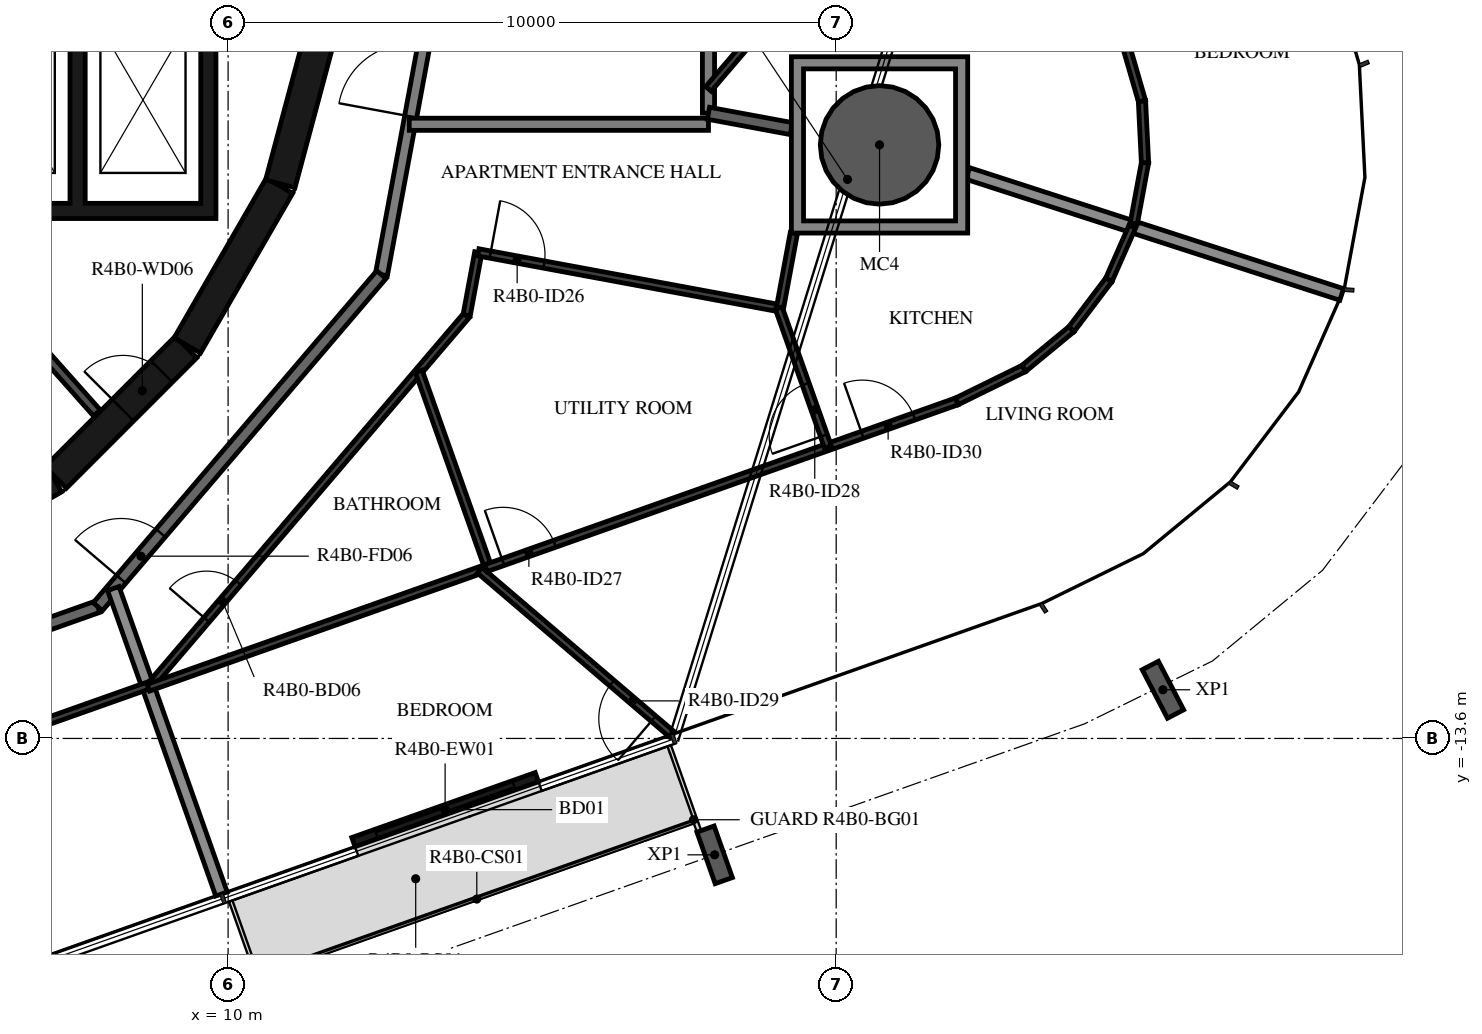
"""IFC4 building model, lengths in metres.
Left out: names, types, materials, properties, quantities, classifications, styles, units other than length and angle.
Written with IfcOpenShell. Run it as: python <this file> out.ifc"""

import sys

from ifc_helpers import new_model, si_unit, direction, frame, frame_2d, origin, origin_2d, place, context, subcontext, project, spatial, polyline, rectangle, hollow_circle, i_section, outline, extrude, element, fill, save


model = new_model("IFC4")
c1 = context("Model", 3, precision=1e-05, world=origin(), true_north=direction((0.0, 1.0)))
c2 = subcontext(c1, "Body", "Model", "MODEL_VIEW")
j1 = project(units=[si_unit("LENGTHUNIT", "METRE"), si_unit("PLANEANGLEUNIT", "RADIAN")], contexts=[c1])
p1 = place(None, origin())
s1 = spatial("IfcSite", under=j1, at=p1, CompositionType="ELEMENT")
p2 = place(p1, origin())
s2 = spatial("IfcBuilding", under=s1, at=p2, CompositionType="ELEMENT")
p3 = place(p2, frame((0.0, 0.0, 165.7)))
s3 = spatial("IfcBuildingStorey", under=s2, at=p3, CompositionType="ELEMENT", Elevation=165.7)
p4 = place(p3, frame((20.713, -3.839, -0.38), z_axis=(0.0, 0.0, 1.0), x_axis=(1.0, 0.0, 0.0)))
e1 = element("IfcColumn", 1, at=p4, inside=s3, PredefinedType="COLUMN", context=c2, shape_type="SweptSolid", body=[
    extrude(hollow_circle(Radius=0.975, WallThickness=0.045, at=origin_2d()), origin(), (0.0, 0.0, 1.0), 3.5),
])
for number, where, z_axis, x_axis in (
    (2, (18.001, -15.514, -0.38), (0.0, 0.0, 1.0), (-0.943, -0.334, 0.0)),
    (3, (25.374, -12.799, -0.38), (0.0, 0.0, 1.0), (-0.887, -0.461, 0.0)),
):
    element("IfcColumn", number, at=place(p3, frame(where, z_axis=z_axis, x_axis=x_axis)), inside=s3, PredefinedType="COLUMN", context=c2, shape_type="SweptSolid", body=[
        extrude(i_section(OverallWidth=0.3, OverallDepth=0.9, WebThickness=0.019, FlangeThickness=0.035, FilletRadius=0.03, at=origin_2d()), origin(), (0.0, 0.0, 1.0), 3.5),
    ])
p5 = place(p3, frame((12.061, -15.305, 0.0), z_axis=(0.0, 0.0, 1.0), x_axis=(0.942620722428, 0.333865502335, 0.0)))
e4 = element("IfcWall", 4, at=p5, inside=s3, PredefinedType="STANDARD", context=c2, shape_type="SweptSolid", body=[
    extrude(rectangle(XDim=3.2, YDim=0.16, at=frame_2d((1.6, 0.0))), origin(), (0.0, 0.0, 1.0), 3.12),
])
p6 = place(p5, frame((0.4, 0.0, 0.0)))
e5 = element("IfcOpeningElement", 5, at=p6, cuts=e4, PredefinedType="OPENING", context=c2, shape_type="SweptSolid", body=[
    extrude(rectangle(XDim=2.4, YDim=2.4, at=frame_2d((1.2, 1.2))), frame((0.0, 0.09, 0.0), z_axis=(0.0, -1.0, 0.0), x_axis=(1.0, 0.0, 0.0)), (0.0, 0.0, 1.0), 0.18),
])
p7 = place(p3, frame((4.51, -10.845, 0.0), z_axis=(0.0, 0.0, 1.0), x_axis=(0.865975092491, 0.500087131594, 0.0)))
e6 = element("IfcWall", 6, at=p7, inside=s3, PredefinedType="SHEAR", context=c2, shape_type="SweptSolid", body=[
    extrude(rectangle(XDim=3.033, YDim=0.5, at=frame_2d((1.516, 0.0))), origin(), (0.0, 0.0, 1.0), 3.12),
])
p8 = place(p7, frame((1.066, 0.0, 0.0)))
e7 = element("IfcOpeningElement", 7, at=p8, cuts=e6, PredefinedType="OPENING", context=c2, shape_type="SweptSolid", body=[
    extrude(rectangle(XDim=0.9, YDim=2.1, at=frame_2d((0.45, 1.05))), frame((0.0, 0.26, 0.0), z_axis=(0.0, -1.0, 0.0), x_axis=(1.0, 0.0, 0.0)), (0.0, 0.0, 1.0), 0.52),
])
p9 = place(p3, frame((7.164, -9.308, 0.0), z_axis=(0.0, 0.0, 1.0), x_axis=(0.707106781187, 0.707106781187, 0.0)))
e8 = element("IfcWall", 8, at=p9, inside=s3, PredefinedType="SHEAR", context=c2, shape_type="SweptSolid", body=[
    extrude(rectangle(XDim=3.032, YDim=0.5, at=frame_2d((1.516, 0.0))), origin(), (0.0, 0.0, 1.0), 3.12),
])
p10 = place(p9, frame((1.566, 0.0, 0.0)))
e9 = element("IfcOpeningElement", 9, at=p10, cuts=e8, PredefinedType="OPENING", context=c2, shape_type="SweptSolid", body=[
    extrude(rectangle(XDim=0.9, YDim=2.1, at=frame_2d((0.45, 1.05))), frame((0.0, 0.26, 0.0), z_axis=(0.0, -1.0, 0.0), x_axis=(1.0, 0.0, 0.0)), (0.0, 0.0, 1.0), 0.52),
])
for number, where, z_axis, x_axis in (
    (10, (9.329, -7.137, 0.0), (0.0, 0.0, 1.0), (0.5, 0.866, 0.0)),
    (11, (10.858, -4.479, 0.0), (0.0, 0.0, 1.0), (0.259, 0.966, 0.0)),
):
    element("IfcWall", number, at=place(p3, frame(where, z_axis=z_axis, x_axis=x_axis)), inside=s3, PredefinedType="SHEAR", context=c2, shape_type="SweptSolid", body=[
        extrude(rectangle(XDim=3.033, YDim=0.5, at=frame_2d((1.516, 0.0))), origin(), (0.0, 0.0, 1.0), 3.12),
    ])
p11 = place(p3, origin())
e12 = element("IfcWall", 12, at=p11, inside=s3, PredefinedType="SHEAR", context=c2, shape_type="SweptSolid", body=[
    extrude(outline(polyline([(9.8, -5.05), (9.8, -4.8), (9.8, -1.9), (9.55, -1.9), (9.55, -4.8), (7.65, -4.8), (7.65, -1.9), (7.4, -1.9), (7.4, -4.8), (5.5, -4.8), (5.5, -1.9), (5.25, -1.9), (5.25, -4.8), (3.35, -4.8), (3.35, -1.9), (3.1, -1.9), (3.1, -4.8), (1.2, -4.8), (1.2, -1.9), (0.95, -1.9), (0.95, -4.8), (-5.25, -4.8), (-5.25, -1.9), (-5.5, -1.9), (-5.5, -4.8), (-7.4, -4.8), (-7.4, -1.9), (-7.65, -1.9), (-7.65, -4.8), (-9.55, -4.8), (-9.55, -1.9), (-9.8, -1.9), (-9.8, -4.8), (-9.8, -5.05), (9.8, -5.05)])), origin(), (0.0, 0.0, 1.0), 3.12),
])
p12 = place(p3, frame((7.842, -8.248, 0.0), z_axis=(0.0, 0.0, 1.0), x_axis=(-0.66446128181, 0.747322691329, 0.0)))
e13 = element("IfcWall", 13, at=p12, inside=s3, PredefinedType="PARTITIONING", context=c2, shape_type="SweptSolid", body=[
    extrude(rectangle(XDim=4.198, YDim=0.15, at=frame_2d((2.099, 0.0))), origin(), (0.0, 0.0, 1.0), 3.12),
])
p13 = place(p3, frame((12.521, -5.972, 0.0), z_axis=(0.0, 0.0, 1.0), x_axis=(0.182244189886, 0.983253301674, 0.0)))
e14 = element("IfcWall", 14, at=p13, inside=s3, PredefinedType="STANDARD", context=c2, shape_type="SweptSolid", body=[
    extrude(rectangle(XDim=4.176, YDim=0.2, at=frame_2d((2.088, 0.0))), origin(), (0.0, 0.0, 1.0), 3.12),
])
p14 = place(p13, frame((2.645, 0.0, 0.0)))
e15 = element("IfcOpeningElement", 15, at=p14, cuts=e14, PredefinedType="OPENING", context=c2, shape_type="SweptSolid", body=[
    extrude(rectangle(XDim=1.2, YDim=2.1, at=frame_2d((0.6, 1.05))), frame((0.0, 0.11, 0.0), z_axis=(0.0, -1.0, 0.0), x_axis=(1.0, 0.0, 0.0)), (0.0, 0.0, 1.0), 0.22),
])
p15 = place(p3, frame((1.088, -13.83, 0.0), z_axis=(0.0, 0.0, 1.0), x_axis=(0.942648397945, 0.333787354241, 0.0)))
e16 = element("IfcWall", 16, at=p15, inside=s3, PredefinedType="STANDARD", context=c2, shape_type="SweptSolid", body=[
    extrude(rectangle(XDim=7.181, YDim=0.2, at=frame_2d((3.591, 0.0))), origin(), (0.0, 0.0, 1.0), 3.12),
])
p16 = place(p3, frame((7.858, -11.433, 0.0), z_axis=(0.0, 0.0, 1.0), x_axis=(0.649440801937, 0.760412154545, 0.0)))
e17 = element("IfcWall", 17, at=p16, inside=s3, PredefinedType="STANDARD", context=c2, shape_type="SweptSolid", body=[
    extrude(rectangle(XDim=7.181, YDim=0.2, at=frame_2d((3.59, 0.0))), origin(), (0.0, 0.0, 1.0), 3.12),
])
p17 = place(p16, frame((0.592, 0.0, 0.0)))
e18 = element("IfcOpeningElement", 18, at=p17, cuts=e17, PredefinedType="OPENING", context=c2, shape_type="SweptSolid", body=[
    extrude(rectangle(XDim=1.0, YDim=2.1, at=frame_2d((0.5, 1.05))), frame((0.0, 0.11, 0.0), z_axis=(0.0, -1.0, 0.0), x_axis=(1.0, 0.0, 0.0)), (0.0, 0.0, 1.0), 0.22),
])
p18 = place(p3, frame((17.9, -3.318, 0.0), z_axis=(0.0, 0.0, 1.0), x_axis=(0.0, 1.0, 0.0)))
e19 = element("IfcWall", 19, at=p18, inside=s3, PredefinedType="STANDARD", context=c2, shape_type="SweptSolid", body=[
    extrude(rectangle(XDim=6.818, YDim=0.2, at=frame_2d((3.409, 0.0))), origin(), (0.0, 0.0, 1.0), 3.12),
])
p19 = place(p3, frame((12.979, -3.5, 0.0), z_axis=(0.0, 0.0, 1.0), x_axis=(1.0, 0.0, 0.0)))
e20 = element("IfcWall", 20, at=p19, inside=s3, PredefinedType="STANDARD", context=c2, shape_type="SweptSolid", body=[
    extrude(rectangle(XDim=4.92, YDim=0.2, at=frame_2d((2.46, 0.0))), origin(), (0.0, 0.0, 1.0), 3.12),
])
p20 = place(p3, frame((17.9, -3.319, 0.0), z_axis=(0.0, 0.0, 1.0), x_axis=(0.983246950753, -0.182278451375, 0.0)))
e21 = element("IfcWall", 21, at=p20, inside=s3, PredefinedType="STANDARD", context=c2, shape_type="SweptSolid", body=[
    extrude(rectangle(XDim=1.386, YDim=0.2, at=frame_2d((0.693, 0.0))), origin(), (0.0, 0.0, 1.0), 3.12),
])
p21 = place(p3, frame((22.163, -4.308, 0.0), z_axis=(0.0, 0.0, 1.0), x_axis=(0.951422718769, -0.307887658426, 0.0)))
e22 = element("IfcWall", 22, at=p21, inside=s3, PredefinedType="STANDARD", context=c2, shape_type="SweptSolid", body=[
    extrude(rectangle(XDim=6.464, YDim=0.2, at=frame_2d((3.232, 0.0))), origin(), (0.0, 0.0, 1.0), 2.73),
])
p22 = place(p3, frame((9.891, -16.158, 0.0), z_axis=(0.0, 0.0, 1.0), x_axis=(-0.333807281402, 0.942641341594, 0.0)))
e23 = element("IfcWall", 23, at=p22, inside=s3, PredefinedType="STANDARD", context=c2, shape_type="SweptSolid", body=[
    extrude(rectangle(XDim=5.329, YDim=0.2, at=frame_2d((2.665, 0.0))), origin(), (0.0, 0.0, 1.0), 2.73),
])
p23 = place(p3, frame((17.9, -2.918, 0.0), z_axis=(0.0, 0.0, 1.0), x_axis=(0.649469887983, 0.760387312232, 0.0)))
e24 = element("IfcWall", 24, at=p23, inside=s3, PredefinedType="PARTITIONING", context=c2, shape_type="SweptSolid", body=[
    extrude(rectangle(XDim=5.527, YDim=0.12, at=frame_2d((2.763, 0.0))), origin(), (0.0, 0.0, 1.0), 3.12),
])
p24 = place(p23, frame((1.7, 0.0, 0.0)))
e25 = element("IfcOpeningElement", 25, at=p24, cuts=e24, PredefinedType="OPENING", context=c2, shape_type="SweptSolid", body=[
    extrude(rectangle(XDim=0.9, YDim=2.1, at=frame_2d((0.45, 1.05))), frame((0.0, 0.07, 0.0), z_axis=(0.0, -1.0, 0.0), x_axis=(1.0, 0.0, 0.0)), (0.0, 0.0, 1.0), 0.14),
])
for number, where, z_axis, x_axis in (
    (26, (24.894, -5.131, 0.0), (0.0, 0.0, 1.0), (0.182, 0.983, 0.0)),
    (27, (25.079, -4.132, 0.0), (0.0, 0.0, 1.0), (-0.049, 0.999, 0.0)),
):
    element("IfcWall", number, at=place(p3, frame(where, z_axis=z_axis, x_axis=x_axis)), inside=s3, PredefinedType="PARTITIONING", context=c2, shape_type="SweptSolid", body=[
        extrude(rectangle(XDim=1.016, YDim=0.12, at=frame_2d((0.508, 0.0))), origin(), (0.0, 0.0, 1.0), 3.12),
    ])
p25 = place(p3, frame((25.029, -3.117, 0.0), z_axis=(0.0, 0.0, 1.0), x_axis=(-0.278559922069, 0.96041885124, 0.0)))
e28 = element("IfcWall", 28, at=p25, inside=s3, PredefinedType="PARTITIONING", context=c2, shape_type="SweptSolid", body=[
    extrude(rectangle(XDim=1.016, YDim=0.12, at=frame_2d((0.508, 0.0))), origin(), (0.0, 0.0, 1.0), 3.12),
])
p26 = place(p3, frame((1.269, -15.357, 0.0), z_axis=(0.0, 0.0, 1.0), x_axis=(0.942639442898, 0.333812643101, 0.0)))
e29 = element("IfcWall", 29, at=p26, inside=s3, PredefinedType="PARTITIONING", context=c2, shape_type="SweptSolid", body=[
    extrude(rectangle(XDim=7.86, YDim=0.12, at=frame_2d((3.93, 0.0))), origin(), (0.0, 0.0, 1.0), 3.12),
])
p27 = place(p26, frame((0.2, 0.0, 0.0)))
e30 = element("IfcOpeningElement", 30, at=p27, cuts=e29, PredefinedType="OPENING", context=c2, shape_type="SweptSolid", body=[
    extrude(rectangle(XDim=0.9, YDim=2.1, at=frame_2d((0.45, 1.05))), frame((0.0, 0.07, 0.0), z_axis=(0.0, -1.0, 0.0), x_axis=(1.0, 0.0, 0.0)), (0.0, 0.0, 1.0), 0.14),
])
p28 = place(p3, frame((8.737, -12.713, 0.0), z_axis=(0.0, 0.0, 1.0), x_axis=(0.649430604754, 0.760420863476, 0.0)))
e31 = element("IfcWall", 31, at=p28, inside=s3, PredefinedType="PARTITIONING", context=c2, shape_type="SweptSolid", body=[
    extrude(rectangle(XDim=7.985, YDim=0.12, at=frame_2d((3.992, 0.0))), origin(), (0.0, 0.0, 1.0), 3.12),
])
p29 = place(p28, frame((1.4, 0.0, 0.0)))
e32 = element("IfcOpeningElement", 32, at=p29, cuts=e31, PredefinedType="OPENING", context=c2, shape_type="SweptSolid", body=[
    extrude(rectangle(XDim=0.8, YDim=2.1, at=frame_2d((0.4, 1.05))), frame((0.0, 0.07, 0.0), z_axis=(0.0, -1.0, 0.0), x_axis=(1.0, 0.0, 0.0)), (0.0, 0.0, 1.0), 0.14),
])
p30 = place(p3, frame((13.923, -6.641, 0.0), z_axis=(0.0, 0.0, 1.0), x_axis=(0.182396711264, 0.983225019881, 0.0)))
e33 = element("IfcWall", 33, at=p30, inside=s3, PredefinedType="PARTITIONING", context=c2, shape_type="SweptSolid", body=[
    extrude(rectangle(XDim=1.052, YDim=0.12, at=frame_2d((0.526, 0.0))), origin(), (0.0, 0.0, 1.0), 3.12),
])
p31 = place(p3, frame((14.115, -5.606, 0.0), z_axis=(0.0, 0.0, 1.0), x_axis=(0.983252350103, -0.182249323775, 0.0)))
e34 = element("IfcWall", 34, at=p31, inside=s3, PredefinedType="PARTITIONING", context=c2, shape_type="SweptSolid", body=[
    extrude(rectangle(XDim=5.025, YDim=0.12, at=frame_2d((2.512, 0.0))), origin(), (0.0, 0.0, 1.0), 3.12),
])
p32 = place(p31, frame((0.2, 0.0, 0.0)))
e35 = element("IfcOpeningElement", 35, at=p32, cuts=e34, PredefinedType="OPENING", context=c2, shape_type="SweptSolid", body=[
    extrude(rectangle(XDim=0.9, YDim=2.1, at=frame_2d((0.45, 1.05))), frame((0.0, 0.07, 0.0), z_axis=(0.0, -1.0, 0.0), x_axis=(1.0, 0.0, 0.0)), (0.0, 0.0, 1.0), 0.14),
])
p33 = place(p3, frame((19.075, -6.526, 0.0), z_axis=(0.0, 0.0, 1.0), x_axis=(0.182283897093, 0.983245941187, 0.0)))
e36 = element("IfcWall", 36, at=p33, inside=s3, PredefinedType="PARTITIONING", context=c2, shape_type="SweptSolid", body=[
    extrude(rectangle(XDim=1.258, YDim=0.12, at=frame_2d((0.629, 0.0))), origin(), (0.0, 0.0, 1.0), 3.12),
])
p34 = place(p3, frame((14.183, -10.819, 0.0), z_axis=(0.0, 0.0, 1.0), x_axis=(-0.942646448855, -0.333792858612, 0.0)))
e37 = element("IfcWall", 37, at=p34, inside=s3, PredefinedType="PARTITIONING", context=c2, shape_type="SweptSolid", body=[
    extrude(rectangle(XDim=5.828, YDim=0.12, at=frame_2d((2.914, 0.0))), origin(), (0.0, 0.0, 1.0), 3.12),
])
p35 = place(p3, frame((17.3, -13.534, 0.0), z_axis=(0.0, 0.0, 1.0), x_axis=(-0.760428665789, 0.649421468883, 0.0)))
e38 = element("IfcWall", 38, at=p35, inside=s3, PredefinedType="PARTITIONING", context=c2, shape_type="SweptSolid", body=[
    extrude(rectangle(XDim=4.157, YDim=0.12, at=frame_2d((2.078, 0.0))), origin(), (0.0, 0.0, 1.0), 3.12),
])
p36 = place(p35, frame((0.4, 0.0, 0.0)))
e39 = element("IfcOpeningElement", 39, at=p36, cuts=e38, PredefinedType="OPENING", context=c2, shape_type="SweptSolid", body=[
    extrude(rectangle(XDim=0.9, YDim=2.1, at=frame_2d((0.45, 1.05))), frame((0.0, 0.07, 0.0), z_axis=(0.0, -1.0, 0.0), x_axis=(1.0, 0.0, 0.0)), (0.0, 0.0, 1.0), 0.14),
])
p37 = place(p3, frame((14.277, -10.786, 0.0), z_axis=(0.0, 0.0, 1.0), x_axis=(-0.333865646111, 0.942620671504, 0.0)))
e40 = element("IfcWall", 40, at=p37, inside=s3, PredefinedType="PARTITIONING", context=c2, shape_type="SweptSolid", body=[
    extrude(rectangle(XDim=3.419, YDim=0.12, at=frame_2d((1.71, 0.0))), origin(), (0.0, 0.0, 1.0), 3.12),
])
p38 = place(p3, frame((14.239, -10.799, 0.0), z_axis=(0.0, 0.0, 1.0), x_axis=(0.94264202959, 0.333805338558, 0.0)))
e41 = element("IfcWall", 41, at=p38, inside=s3, PredefinedType="PARTITIONING", context=c2, shape_type="SweptSolid", body=[
    extrude(rectangle(XDim=8.216, YDim=0.12, at=frame_2d((4.108, 0.0))), origin(), (0.0, 0.0, 1.0), 3.12),
])
p39 = place(p38, frame((0.3, 0.0, 0.0)))
e42 = element("IfcOpeningElement", 42, at=p39, cuts=e41, PredefinedType="OPENING", context=c2, shape_type="SweptSolid", body=[
    extrude(rectangle(XDim=0.9, YDim=2.1, at=frame_2d((0.45, 1.05))), frame((0.0, 0.07, 0.0), z_axis=(0.0, -1.0, 0.0), x_axis=(1.0, 0.0, 0.0)), (0.0, 0.0, 1.0), 0.14),
])
p40 = place(p38, frame((6.568, 0.0, 0.0)))
e43 = element("IfcOpeningElement", 43, at=p40, cuts=e41, PredefinedType="OPENING", context=c2, shape_type="SweptSolid", body=[
    extrude(rectangle(XDim=0.9, YDim=2.1, at=frame_2d((0.45, 1.05))), frame((0.0, 0.07, 0.0), z_axis=(0.0, -1.0, 0.0), x_axis=(1.0, 0.0, 0.0)), (0.0, 0.0, 1.0), 0.14),
])
p41 = place(p3, frame((19.865, -8.807, 0.0), z_axis=(0.0, 0.0, 1.0), x_axis=(-0.33378934261, 0.942647693871, 0.0)))
e44 = element("IfcWall", 44, at=p41, inside=s3, PredefinedType="PARTITIONING", context=c2, shape_type="SweptSolid", body=[
    extrude(rectangle(XDim=2.424, YDim=0.12, at=frame_2d((1.212, 0.0))), origin(), (0.0, 0.0, 1.0), 3.12),
])
p42 = place(p41, frame((0.2, 0.0, 0.0)))
e45 = element("IfcOpeningElement", 45, at=p42, cuts=e44, PredefinedType="OPENING", context=c2, shape_type="SweptSolid", body=[
    extrude(rectangle(XDim=0.9, YDim=2.1, at=frame_2d((0.45, 1.05))), frame((0.0, 0.07, 0.0), z_axis=(0.0, -1.0, 0.0), x_axis=(1.0, 0.0, 0.0)), (0.0, 0.0, 1.0), 0.14),
])
p43 = place(p3, frame((24.87, -5.184, 0.0), z_axis=(0.0, 0.0, 1.0), x_axis=(-0.404173771344, -0.914682219439, 0.0)))
e46 = element("IfcWall", 46, at=p43, inside=s3, PredefinedType="PARTITIONING", context=c2, shape_type="SweptSolid", body=[
    extrude(rectangle(XDim=0.958, YDim=0.12, at=frame_2d((0.479, 0.0))), origin(), (0.0, 0.0, 1.0), 3.12),
])
for number, where, z_axis, x_axis in (
    (47, (24.483, -6.06, 0.0), (0.0, 0.0, 1.0), (-0.604, -0.797, 0.0)),
    (48, (23.869, -6.869, 0.0), (0.0, 0.0, 1.0), (-0.772, -0.636, 0.0)),
):
    element("IfcWall", number, at=place(p3, frame(where, z_axis=z_axis, x_axis=x_axis)), inside=s3, PredefinedType="PARTITIONING", context=c2, shape_type="SweptSolid", body=[
        extrude(rectangle(XDim=1.016, YDim=0.12, at=frame_2d((0.508, 0.0))), origin(), (0.0, 0.0, 1.0), 3.12),
    ])
p44 = place(p3, frame((23.085, -7.515, 0.0), z_axis=(0.0, 0.0, 1.0), x_axis=(-0.897431337015, -0.441154162786, 0.0)))
e49 = element("IfcWall", 49, at=p44, inside=s3, PredefinedType="PARTITIONING", context=c2, shape_type="SweptSolid", body=[
    extrude(rectangle(XDim=1.227, YDim=0.12, at=frame_2d((0.613, 0.0))), origin(), (0.0, 0.0, 1.0), 3.12),
])
p45 = place(p3, origin())
e50 = element("IfcWall", 50, at=p45, inside=s3, PredefinedType="STANDARD", context=c2, shape_type="SweptSolid", body=[
    extrude(outline(polyline([(22.163, -2.389), (22.163, -5.289), (19.263, -5.289), (19.263, -2.389), (22.163, -2.389)]), holes=[polyline([(19.463, -5.089), (21.963, -5.089), (21.963, -2.589), (19.463, -2.589), (19.463, -5.089)])]), origin(), (0.0, 0.0, 1.0), 3.12),
])
p46 = place(p6, origin())
e51 = element("IfcDoor", 51, at=p46, inside=s3, OperationType="DOUBLE_DOOR_SLIDING", PredefinedType="DOOR", context=c2, shape_type="SweptSolid", body=[
    extrude(rectangle(XDim=2.4, YDim=2.4, at=frame_2d((1.2, 1.2))), frame((0.0, 0.025, 0.0), z_axis=(0.0, -1.0, 0.0), x_axis=(1.0, 0.0, 0.0)), (0.0, 0.0, 1.0), 0.05),
])
fill(e5, e51)
p47 = place(p10, origin())
e52 = element("IfcDoor", 52, at=p47, inside=s3, OperationType="SINGLE_SWING_RIGHT", PredefinedType="DOOR", context=c2, shape_type="SweptSolid", body=[
    extrude(rectangle(XDim=0.9, YDim=2.1, at=frame_2d((0.45, 1.05))), frame((0.0, 0.025, 0.0), z_axis=(0.0, -1.0, 0.0), x_axis=(1.0, 0.0, 0.0)), (0.0, 0.0, 1.0), 0.05),
])
fill(e9, e52)
p48 = place(p17, origin())
e53 = element("IfcDoor", 53, at=p48, inside=s3, OperationType="SINGLE_SWING_RIGHT", PredefinedType="DOOR", context=c2, shape_type="SweptSolid", body=[
    extrude(rectangle(XDim=1.0, YDim=2.1, at=frame_2d((0.5, 1.05))), frame((0.0, 0.025, 0.0), z_axis=(0.0, -1.0, 0.0), x_axis=(1.0, 0.0, 0.0)), (0.0, 0.0, 1.0), 0.05),
])
fill(e18, e53)
p49 = place(p29, origin())
e54 = element("IfcDoor", 54, at=p49, inside=s3, OperationType="SINGLE_SWING_RIGHT", PredefinedType="DOOR", context=c2, shape_type="SweptSolid", body=[
    extrude(rectangle(XDim=0.8, YDim=2.1, at=frame_2d((0.4, 1.05))), frame((0.0, 0.025, 0.0), z_axis=(0.0, -1.0, 0.0), x_axis=(1.0, 0.0, 0.0)), (0.0, 0.0, 1.0), 0.05),
])
fill(e32, e54)
p50 = place(p32, origin())
e55 = element("IfcDoor", 55, at=p50, inside=s3, OperationType="SINGLE_SWING_RIGHT", PredefinedType="DOOR", context=c2, shape_type="SweptSolid", body=[
    extrude(rectangle(XDim=0.9, YDim=2.1, at=frame_2d((0.45, 1.05))), frame((0.0, 0.025, 0.0), z_axis=(0.0, -1.0, 0.0), x_axis=(1.0, 0.0, 0.0)), (0.0, 0.0, 1.0), 0.05),
])
fill(e35, e55)
p51 = place(p39, origin())
e56 = element("IfcDoor", 56, at=p51, inside=s3, OperationType="SINGLE_SWING_RIGHT", PredefinedType="DOOR", context=c2, shape_type="SweptSolid", body=[
    extrude(rectangle(XDim=0.9, YDim=2.1, at=frame_2d((0.45, 1.05))), frame((0.0, 0.025, 0.0), z_axis=(0.0, -1.0, 0.0), x_axis=(1.0, 0.0, 0.0)), (0.0, 0.0, 1.0), 0.05),
])
fill(e42, e56)
p52 = place(p42, origin())
e57 = element("IfcDoor", 57, at=p52, inside=s3, OperationType="SINGLE_SWING_RIGHT", PredefinedType="DOOR", context=c2, shape_type="SweptSolid", body=[
    extrude(rectangle(XDim=0.9, YDim=2.1, at=frame_2d((0.45, 1.05))), frame((0.0, 0.025, 0.0), z_axis=(0.0, -1.0, 0.0), x_axis=(1.0, 0.0, 0.0)), (0.0, 0.0, 1.0), 0.05),
])
fill(e45, e57)
p53 = place(p36, origin())
e58 = element("IfcDoor", 58, at=p53, inside=s3, OperationType="SINGLE_SWING_LEFT", PredefinedType="DOOR", context=c2, shape_type="SweptSolid", body=[
    extrude(rectangle(XDim=0.9, YDim=2.1, at=frame_2d((0.45, 1.05))), frame((0.0, 0.025, 0.0), z_axis=(0.0, -1.0, 0.0), x_axis=(1.0, 0.0, 0.0)), (0.0, 0.0, 1.0), 0.05),
])
fill(e39, e58)
p54 = place(p40, origin())
e59 = element("IfcDoor", 59, at=p54, inside=s3, OperationType="SINGLE_SWING_LEFT", PredefinedType="DOOR", context=c2, shape_type="SweptSolid", body=[
    extrude(rectangle(XDim=0.9, YDim=2.1, at=frame_2d((0.45, 1.05))), frame((0.0, 0.025, 0.0), z_axis=(0.0, -1.0, 0.0), x_axis=(1.0, 0.0, 0.0)), (0.0, 0.0, 1.0), 0.05),
])
fill(e43, e59)
p55 = place(p14, origin())
e60 = element("IfcDoor", 60, at=p55, inside=s3, OperationType="DOUBLE_DOOR_SINGLE_SWING", PredefinedType="DOOR", context=c2, shape_type="SweptSolid", body=[
    extrude(rectangle(XDim=1.2, YDim=2.1, at=frame_2d((0.6, 1.05))), frame((0.0, 0.025, 0.0), z_axis=(0.0, -1.0, 0.0), x_axis=(1.0, 0.0, 0.0)), (0.0, 0.0, 1.0), 0.05),
])
fill(e15, e60)
save(model, sys.argv[1])
